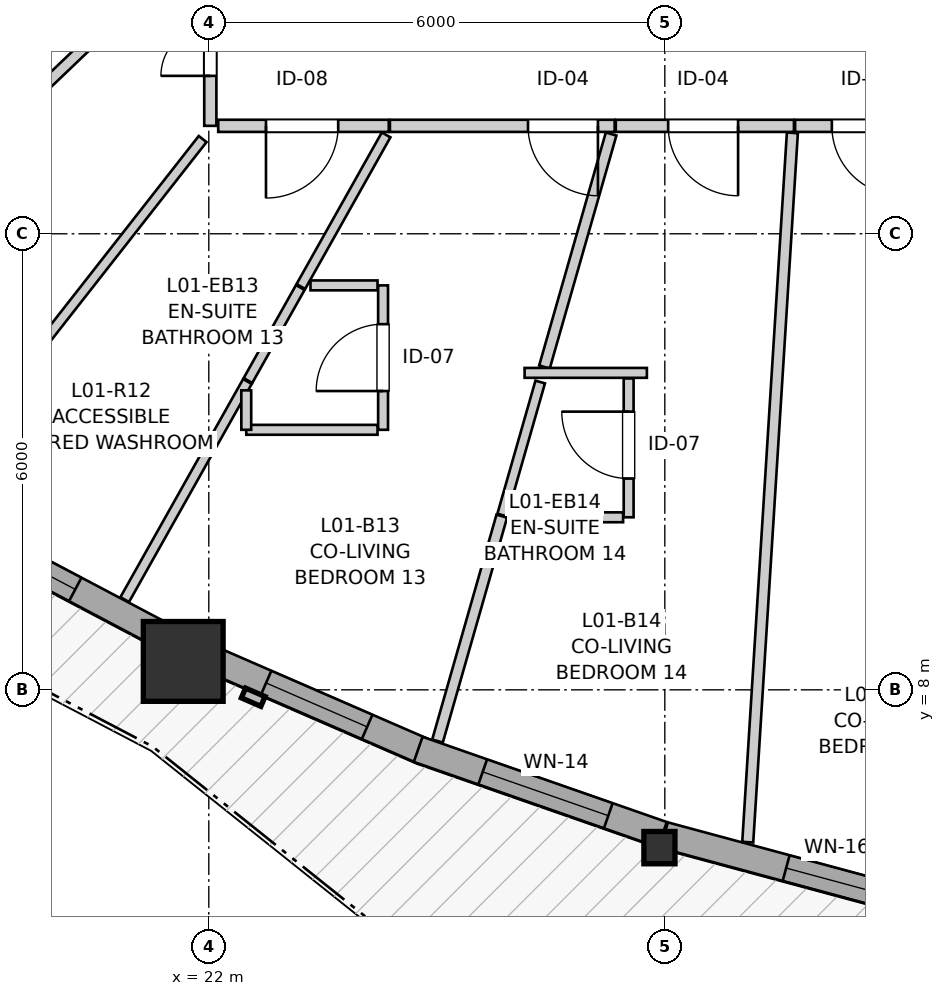
"""IFC4 building model, lengths in metres.
Left out: names, types, materials, properties, quantities, classifications, styles, units other than length and angle.
Written with IfcOpenShell. Run it as: python <this file> out.ifc"""

import sys

from ifc_helpers import new_model, si_unit, direction, frame, frame_2d, origin, origin_2d, place, context, subcontext, project, spatial, rectangle, i_section, extrude, source, transform, mapped, element, fill, save


model = new_model("IFC4")
c1 = context("Model", 3, precision=1e-05, world=origin(), true_north=direction((0.0, 1.0)))
c2 = subcontext(c1, "Body", "Model", "MODEL_VIEW")
j1 = project(units=[si_unit("LENGTHUNIT", "METRE"), si_unit("PLANEANGLEUNIT", "RADIAN")], contexts=[c1])
p1 = place(None, origin())
s1 = spatial("IfcSite", under=j1, at=p1, CompositionType="ELEMENT")
p2 = place(p1, origin())
s2 = spatial("IfcBuilding", under=s1, at=p2, CompositionType="ELEMENT")
p3 = place(p2, frame((0.0, 0.0, 7.8)))
s3 = spatial("IfcBuildingStorey", under=s2, at=p3, CompositionType="ELEMENT", Elevation=7.8)
m1 = source(origin(), c2, "Body", "SweptSolid", [
    extrude(rectangle(XDim=1.05, YDim=1.05, at=origin_2d()), origin(), (0.0, 0.0, 1.0), 2.94),
])
p4 = place(p3, frame((21.664, 8.374, 0.0), z_axis=(0.0, 0.0, 1.0), x_axis=(1.0, 0.0, 0.0)))
e1 = element("IfcColumn", 1, at=p4, inside=s3, PredefinedType="COLUMN", context=c2, shape_type="MappedRepresentation", body=[
    mapped(m1, transform((0.0, 0.0, 0.0), x_axis=(1.0, 0.0, 0.0), y_axis=(0.0, 1.0, 0.0), z_axis=(0.0, 0.0, 1.0), scale=1.0)),
])
m2 = source(origin(), c2, "Body", "SweptSolid", [
    extrude(i_section(OverallWidth=0.409, OverallDepth=0.425, WebThickness=0.03, FlangeThickness=0.048, FilletRadius=0.015, at=origin_2d()), origin(), (0.0, 0.0, 1.0), 2.94),
])
p5 = place(p3, frame((27.929, 5.924, 0.0), z_axis=(0.0, 0.0, 1.0), x_axis=(1.0, 0.0, 0.0)))
e2 = element("IfcColumn", 2, at=p5, inside=s3, PredefinedType="PILASTER", context=c2, shape_type="MappedRepresentation", body=[
    mapped(m2, transform((0.0, 0.0, 0.0), x_axis=(1.0, 0.0, 0.0), y_axis=(0.0, 1.0, 0.0), z_axis=(0.0, 0.0, 1.0), scale=1.0)),
])
p6 = place(p3, frame((18.769, 10.1, 0.0), z_axis=(0.0, 0.0, 1.0), x_axis=(0.884401188265, -0.466727477438, 0.0)))
e3 = element("IfcWall", 3, at=p6, inside=s3, PredefinedType="SOLIDWALL", context=c2, shape_type="SweptSolid", body=[
    extrude(rectangle(XDim=3.066, YDim=0.35, at=frame_2d((1.533, 0.0))), origin(), (0.0, 0.0, 1.0), 2.42),
])
p7 = place(p6, frame((0.717, 0.0, 0.82)))
e4 = element("IfcOpeningElement", 4, at=p7, cuts=e3, PredefinedType="OPENING", context=c2, shape_type="SweptSolid", body=[
    extrude(rectangle(XDim=0.95, YDim=1.35, at=frame_2d((0.475, 0.675))), frame((0.0, 0.185, 0.0), z_axis=(0.0, -1.0, 0.0), x_axis=(1.0, 0.0, 0.0)), (0.0, 0.0, 1.0), 0.37),
])
p8 = place(p3, frame((22.009, 8.415, 0.0), z_axis=(0.0, 0.0, 1.0), x_axis=(0.917077605242, -0.398708748292, 0.0)))
e5 = element("IfcWall", 5, at=p8, inside=s3, PredefinedType="SOLIDWALL", context=c2, shape_type="SweptSolid", body=[
    extrude(rectangle(XDim=3.085, YDim=0.35, at=frame_2d((1.542, 0.0))), origin(), (0.0, 0.0, 1.0), 2.42),
])
p9 = place(p8, frame((0.812, 0.0, 0.82)))
e6 = element("IfcOpeningElement", 6, at=p9, cuts=e5, PredefinedType="OPENING", context=c2, shape_type="SweptSolid", body=[
    extrude(rectangle(XDim=1.45, YDim=1.25, at=frame_2d((0.725, 0.625))), frame((0.0, 0.185, 0.0), z_axis=(0.0, -1.0, 0.0), x_axis=(1.0, 0.0, 0.0)), (0.0, 0.0, 1.0), 0.37),
])
p10 = place(p3, frame((24.755, 7.217, 0.0), z_axis=(0.0, 0.0, 1.0), x_axis=(0.944148800827, -0.329519410501, 0.0)))
e7 = element("IfcWall", 7, at=p10, inside=s3, PredefinedType="SOLIDWALL", context=c2, shape_type="SweptSolid", body=[
    extrude(rectangle(XDim=3.403, YDim=0.35, at=frame_2d((1.701, 0.0))), origin(), (0.0, 0.0, 1.0), 2.42),
])
p11 = place(p10, frame((0.899, 0.0, 0.82)))
e8 = element("IfcOpeningElement", 8, at=p11, cuts=e7, PredefinedType="OPENING", context=c2, shape_type="SweptSolid", body=[
    extrude(rectangle(XDim=1.75, YDim=1.3, at=frame_2d((0.875, 0.65))), frame((0.0, 0.185, 0.0), z_axis=(0.0, -1.0, 0.0), x_axis=(1.0, 0.0, 0.0)), (0.0, 0.0, 1.0), 0.37),
])
p12 = place(p3, frame((27.994, 6.088, 0.0), z_axis=(0.0, 0.0, 1.0), x_axis=(0.965452701472, -0.260578359079, 0.0)))
e9 = element("IfcWall", 9, at=p12, inside=s3, PredefinedType="SOLIDWALL", context=c2, shape_type="SweptSolid", body=[
    extrude(rectangle(XDim=3.459, YDim=0.35, at=frame_2d((1.729, 0.0))), origin(), (0.0, 0.0, 1.0), 2.42),
])
p13 = place(p12, frame((1.66, 0.0, 0.82)))
e10 = element("IfcOpeningElement", 10, at=p13, cuts=e9, PredefinedType="OPENING", context=c2, shape_type="SweptSolid", body=[
    extrude(rectangle(XDim=1.15, YDim=1.2, at=frame_2d((0.575, 0.6))), frame((0.0, 0.185, 0.0), z_axis=(0.0, -1.0, 0.0), x_axis=(1.0, 0.0, 0.0)), (0.0, 0.0, 1.0), 0.37),
])
p14 = place(p3, frame((27.34, 15.42, 0.0), z_axis=(0.0, 0.0, 1.0), x_axis=(-1.0, 0.0, 0.0)))
e11 = element("IfcWall", 11, at=p14, inside=s3, PredefinedType="PARTITIONING", context=c2, shape_type="SweptSolid", body=[
    extrude(rectangle(XDim=2.957, YDim=0.16, at=frame_2d((1.479, 0.0))), origin(), (0.0, 0.0, 1.0), 2.94),
])
p15 = place(p14, frame((0.22, 0.0, 0.0)))
e12 = element("IfcOpeningElement", 12, at=p15, cuts=e11, PredefinedType="OPENING", context=c2, shape_type="SweptSolid", body=[
    extrude(rectangle(XDim=0.92, YDim=2.1, at=frame_2d((0.46, 1.05))), frame((0.0, 0.09, 0.0), z_axis=(0.0, -1.0, 0.0), x_axis=(1.0, 0.0, 0.0)), (0.0, 0.0, 1.0), 0.18),
])
p16 = place(p3, frame((22.02, 15.42, 0.0), z_axis=(0.0, 0.0, 1.0), x_axis=(0.0, 1.0, 0.0)))
e13 = element("IfcWall", 13, at=p16, inside=s3, PredefinedType="PARTITIONING", context=c2, shape_type="SweptSolid", body=[
    extrude(rectangle(XDim=2.579, YDim=0.16, at=frame_2d((1.29, 0.0))), origin(), (0.0, 0.0, 1.0), 2.94),
])
p17 = place(p16, frame((0.657, 0.0, 0.0)))
e14 = element("IfcOpeningElement", 14, at=p17, cuts=e13, PredefinedType="OPENING", context=c2, shape_type="SweptSolid", body=[
    extrude(rectangle(XDim=1.3, YDim=2.1, at=frame_2d((0.65, 1.05))), frame((0.0, 0.09, 0.0), z_axis=(0.0, -1.0, 0.0), x_axis=(1.0, 0.0, 0.0)), (0.0, 0.0, 1.0), 0.18),
])
p18 = place(p3, frame((29.699, 15.42, 0.0), z_axis=(0.0, 0.0, 1.0), x_axis=(-1.0, 0.0, 0.0)))
e15 = element("IfcWall", 15, at=p18, inside=s3, PredefinedType="PARTITIONING", context=c2, shape_type="SweptSolid", body=[
    extrude(rectangle(XDim=2.344, YDim=0.16, at=frame_2d((1.172, 0.0))), origin(), (0.0, 0.0, 1.0), 2.94),
])
p19 = place(p18, frame((0.735, 0.0, 0.0)))
e16 = element("IfcOpeningElement", 16, at=p19, cuts=e15, PredefinedType="OPENING", context=c2, shape_type="SweptSolid", body=[
    extrude(rectangle(XDim=0.92, YDim=2.1, at=frame_2d((0.46, 1.05))), frame((0.0, 0.09, 0.0), z_axis=(0.0, -1.0, 0.0), x_axis=(1.0, 0.0, 0.0)), (0.0, 0.0, 1.0), 0.18),
])
p20 = place(p3, frame((24.368, 15.42, 0.0), z_axis=(0.0, 0.0, 1.0), x_axis=(-1.0, 0.0, 0.0)))
e17 = element("IfcWall", 17, at=p20, inside=s3, PredefinedType="PARTITIONING", context=c2, shape_type="SweptSolid", body=[
    extrude(rectangle(XDim=2.244, YDim=0.16, at=frame_2d((1.122, 0.0))), origin(), (0.0, 0.0, 1.0), 2.94),
])
p21 = place(p20, frame((0.666, 0.0, 0.0)))
e18 = element("IfcOpeningElement", 18, at=p21, cuts=e17, PredefinedType="OPENING", context=c2, shape_type="SweptSolid", body=[
    extrude(rectangle(XDim=0.95, YDim=2.1, at=frame_2d((0.475, 1.05))), frame((0.0, 0.09, 0.0), z_axis=(0.0, -1.0, 0.0), x_axis=(1.0, 0.0, 0.0)), (0.0, 0.0, 1.0), 0.18),
])
p22 = place(p3, frame((31.646, 15.42, 0.0), z_axis=(0.0, 0.0, 1.0), x_axis=(-1.0, 0.0, 0.0)))
e19 = element("IfcWall", 19, at=p22, inside=s3, PredefinedType="PARTITIONING", context=c2, shape_type="SweptSolid", body=[
    extrude(rectangle(XDim=1.932, YDim=0.16, at=frame_2d((0.966, 0.0))), origin(), (0.0, 0.0, 1.0), 2.94),
])
p23 = place(p22, frame((0.529, 0.0, 0.0)))
e20 = element("IfcOpeningElement", 20, at=p23, cuts=e19, PredefinedType="OPENING", context=c2, shape_type="SweptSolid", body=[
    extrude(rectangle(XDim=0.92, YDim=2.1, at=frame_2d((0.46, 1.05))), frame((0.0, 0.09, 0.0), z_axis=(0.0, -1.0, 0.0), x_axis=(1.0, 0.0, 0.0)), (0.0, 0.0, 1.0), 0.18),
])
p24 = place(p3, frame((24.293, 11.421, 0.0), z_axis=(0.0, 0.0, 1.0), x_axis=(0.0, 1.0, 0.0)))
e21 = element("IfcWall", 21, at=p24, inside=s3, PredefinedType="PARTITIONING", context=c2, shape_type="SweptSolid", body=[
    extrude(rectangle(XDim=1.9, YDim=0.13, at=frame_2d((0.95, 0.0))), origin(), (0.0, 0.0, 1.0), 2.94),
])
p25 = place(p24, frame((0.51, 0.0, 0.0)))
e22 = element("IfcOpeningElement", 22, at=p25, cuts=e21, PredefinedType="OPENING", context=c2, shape_type="SweptSolid", body=[
    extrude(rectangle(XDim=0.88, YDim=2.05, at=frame_2d((0.44, 1.025))), frame((0.0, 0.075, 0.0), z_axis=(0.0, -1.0, 0.0), x_axis=(1.0, 0.0, 0.0)), (0.0, 0.0, 1.0), 0.15),
])
p26 = place(p3, frame((27.524, 10.27, 0.0), z_axis=(0.0, 0.0, 1.0), x_axis=(0.0, 1.0, 0.0)))
e23 = element("IfcWall", 23, at=p26, inside=s3, PredefinedType="PARTITIONING", context=c2, shape_type="SweptSolid", body=[
    extrude(rectangle(XDim=1.827, YDim=0.13, at=frame_2d((0.914, 0.0))), origin(), (0.0, 0.0, 1.0), 2.94),
])
p27 = place(p26, frame((0.51, 0.0, 0.0)))
e24 = element("IfcOpeningElement", 24, at=p27, cuts=e23, PredefinedType="OPENING", context=c2, shape_type="SweptSolid", body=[
    extrude(rectangle(XDim=0.88, YDim=2.05, at=frame_2d((0.44, 1.025))), frame((0.0, 0.075, 0.0), z_axis=(0.0, -1.0, 0.0), x_axis=(1.0, 0.0, 0.0)), (0.0, 0.0, 1.0), 0.15),
])
p28 = place(p3, frame((29.091, 5.996, 0.0), z_axis=(0.0, 0.0, 1.0), x_axis=(0.062797687125, 0.998026277456, 0.0)))
e25 = element("IfcWall", 25, at=p28, inside=s3, PredefinedType="PARTITIONING", context=c2, shape_type="SweptSolid", body=[
    extrude(rectangle(XDim=9.35, YDim=0.145, at=frame_2d((4.675, 0.0))), origin(), (0.0, 0.0, 1.0), 2.94),
])
p29 = place(p3, frame((15.888, 12.171, 0.0), z_axis=(0.0, 0.0, 1.0), x_axis=(0.722733244608, 0.691127091886, 0.0)))
e26 = element("IfcWall", 26, at=p29, inside=s3, PredefinedType="PARTITIONING", context=c2, shape_type="SweptSolid", body=[
    extrude(rectangle(XDim=8.296, YDim=0.145, at=frame_2d((4.148, 0.0))), origin(), (0.0, 0.0, 1.0), 2.94),
])
p30 = place(p3, frame((18.296, 10.625, 0.0), z_axis=(0.0, 0.0, 1.0), x_axis=(0.616906721473, 0.787036274261, 0.0)))
e27 = element("IfcWall", 27, at=p30, inside=s3, PredefinedType="PARTITIONING", context=c2, shape_type="SweptSolid", body=[
    extrude(rectangle(XDim=5.872, YDim=0.13, at=frame_2d((2.936, 0.0))), origin(), (0.0, 0.0, 1.0), 2.94),
])
p31 = place(p3, frame((26.417, 12.248, 0.0), z_axis=(0.0, 0.0, 1.0), x_axis=(0.275014447674, 0.961440093594, 0.0)))
e28 = element("IfcWall", 28, at=p31, inside=s3, PredefinedType="PARTITIONING", context=c2, shape_type="SweptSolid", body=[
    extrude(rectangle(XDim=3.188, YDim=0.145, at=frame_2d((1.594, 0.0))), origin(), (0.0, 0.0, 1.0), 2.94),
])
p32 = place(p3, frame((20.894, 9.187, 0.0), z_axis=(0.0, 0.0, 1.0), x_axis=(0.490433761368, 0.871478471169, 0.0)))
e29 = element("IfcWall", 29, at=p32, inside=s3, PredefinedType="PARTITIONING", context=c2, shape_type="SweptSolid", body=[
    extrude(rectangle(XDim=3.292, YDim=0.13, at=frame_2d((1.646, 0.0))), origin(), (0.0, 0.0, 1.0), 2.94),
])
p33 = place(p3, frame((25.009, 7.327, 0.0), z_axis=(0.0, 0.0, 1.0), x_axis=(0.274867847045, 0.961482015776, 0.0)))
e30 = element("IfcWall", 30, at=p33, inside=s3, PredefinedType="PARTITIONING", context=c2, shape_type="SweptSolid", body=[
    extrude(rectangle(XDim=3.077, YDim=0.145, at=frame_2d((1.538, 0.0))), origin(), (0.0, 0.0, 1.0), 2.94),
])
p34 = place(p3, frame((23.211, 13.306, 0.0), z_axis=(0.0, 0.0, 1.0), x_axis=(0.490235923681, 0.871589776864, 0.0)))
e31 = element("IfcWall", 31, at=p34, inside=s3, PredefinedType="PARTITIONING", context=c2, shape_type="SweptSolid", body=[
    extrude(rectangle(XDim=2.289, YDim=0.13, at=frame_2d((1.145, 0.0))), origin(), (0.0, 0.0, 1.0), 2.94),
])
p35 = place(p3, frame((25.86, 10.299, 0.0), z_axis=(0.0, 0.0, 1.0), x_axis=(0.275022188369, 0.961437879379, 0.0)))
e32 = element("IfcWall", 32, at=p35, inside=s3, PredefinedType="PARTITIONING", context=c2, shape_type="SweptSolid", body=[
    extrude(rectangle(XDim=1.821, YDim=0.13, at=frame_2d((0.91, 0.0))), origin(), (0.0, 0.0, 1.0), 2.94),
])
p36 = place(p3, frame((22.493, 11.421, 0.0), z_axis=(0.0, 0.0, 1.0), x_axis=(1.0, 0.0, 0.0)))
e33 = element("IfcWall", 33, at=p36, inside=s3, PredefinedType="PARTITIONING", context=c2, shape_type="SweptSolid", body=[
    extrude(rectangle(XDim=1.727, YDim=0.13, at=frame_2d((0.864, 0.0))), origin(), (0.0, 0.0, 1.0), 2.508),
])
p37 = place(p3, frame((25.953, 10.27, 0.0), z_axis=(0.0, 0.0, 1.0), x_axis=(1.0, 0.0, 0.0)))
e34 = element("IfcWall", 34, at=p37, inside=s3, PredefinedType="PARTITIONING", context=c2, shape_type="SweptSolid", body=[
    extrude(rectangle(XDim=1.498, YDim=0.13, at=frame_2d((0.749, 0.0))), origin(), (0.0, 0.0, 1.0), 2.508),
])
p38 = place(p3, frame((22.515, 12.069, 0.0), z_axis=(0.0, 0.0, 1.0), x_axis=(0.490286002917, 0.871561607314, 0.0)))
e35 = element("IfcWall", 35, at=p38, inside=s3, PredefinedType="PARTITIONING", context=c2, shape_type="SweptSolid", body=[
    extrude(rectangle(XDim=1.404, YDim=0.13, at=frame_2d((0.702, 0.0))), origin(), (0.0, 0.0, 1.0), 2.94),
])
p39 = place(p3, frame((26.155, 12.17, 0.0), z_axis=(0.0, 0.0, 1.0), x_axis=(1.0, 0.0, 0.0)))
e36 = element("IfcWall", 36, at=p39, inside=s3, PredefinedType="PARTITIONING", context=c2, shape_type="SweptSolid", body=[
    extrude(rectangle(XDim=1.609, YDim=0.13, at=frame_2d((0.804, 0.0))), origin(), (0.0, 0.0, 1.0), 2.94),
])
p40 = place(p3, frame((23.338, 13.321, 0.0), z_axis=(0.0, 0.0, 1.0), x_axis=(1.0, 0.0, 0.0)))
e37 = element("IfcWall", 37, at=p40, inside=s3, PredefinedType="PARTITIONING", context=c2, shape_type="SweptSolid", body=[
    extrude(rectangle(XDim=0.882, YDim=0.13, at=frame_2d((0.441, 0.0))), origin(), (0.0, 0.0, 1.0), 2.94),
])
p41 = place(p3, frame((22.493, 11.421, 0.0), z_axis=(0.0, 0.0, 1.0), x_axis=(0.0, 1.0, 0.0)))
e38 = element("IfcWall", 38, at=p41, inside=s3, PredefinedType="PARTITIONING", context=c2, shape_type="SweptSolid", body=[
    extrude(rectangle(XDim=0.519, YDim=0.13, at=frame_2d((0.26, 0.0))), origin(), (0.0, 0.0, 1.0), 2.94),
])
m3 = source(origin(), c2, "Body", "SweptSolid", [
    extrude(rectangle(XDim=0.95, YDim=1.35, at=frame_2d((0.475, 0.675))), frame((0.0, 0.03, 0.0), z_axis=(0.0, -1.0, 0.0), x_axis=(1.0, 0.0, 0.0)), (0.0, 0.0, 1.0), 0.06),
])
p42 = place(p7, origin())
e39 = element("IfcWindow", 39, at=p42, inside=s3, PartitioningType="SINGLE_PANEL", PredefinedType="WINDOW", context=c2, shape_type="MappedRepresentation", body=[
    mapped(m3, transform((0.0, 0.0, 0.0), x_axis=(1.0, 0.0, 0.0), y_axis=(0.0, 1.0, 0.0), z_axis=(0.0, 0.0, 1.0), scale=1.0)),
])
fill(e4, e39)
m4 = source(origin(), c2, "Body", "SweptSolid", [
    extrude(rectangle(XDim=1.45, YDim=1.25, at=frame_2d((0.725, 0.625))), frame((0.0, 0.03, 0.0), z_axis=(0.0, -1.0, 0.0), x_axis=(1.0, 0.0, 0.0)), (0.0, 0.0, 1.0), 0.06),
])
p43 = place(p9, origin())
e40 = element("IfcWindow", 40, at=p43, inside=s3, PartitioningType="SINGLE_PANEL", PredefinedType="WINDOW", context=c2, shape_type="MappedRepresentation", body=[
    mapped(m4, transform((0.0, 0.0, 0.0), x_axis=(1.0, 0.0, 0.0), y_axis=(0.0, 1.0, 0.0), z_axis=(0.0, 0.0, 1.0), scale=1.0)),
])
fill(e6, e40)
m5 = source(origin(), c2, "Body", "SweptSolid", [
    extrude(rectangle(XDim=1.75, YDim=1.3, at=frame_2d((0.875, 0.65))), frame((0.0, 0.03, 0.0), z_axis=(0.0, -1.0, 0.0), x_axis=(1.0, 0.0, 0.0)), (0.0, 0.0, 1.0), 0.06),
])
p44 = place(p11, origin())
e41 = element("IfcWindow", 41, at=p44, inside=s3, PartitioningType="SINGLE_PANEL", PredefinedType="WINDOW", context=c2, shape_type="MappedRepresentation", body=[
    mapped(m5, transform((0.0, 0.0, 0.0), x_axis=(1.0, 0.0, 0.0), y_axis=(0.0, 1.0, 0.0), z_axis=(0.0, 0.0, 1.0), scale=1.0)),
])
fill(e8, e41)
m6 = source(origin(), c2, "Body", "SweptSolid", [
    extrude(rectangle(XDim=1.15, YDim=1.2, at=frame_2d((0.575, 0.6))), frame((0.0, 0.03, 0.0), z_axis=(0.0, -1.0, 0.0), x_axis=(1.0, 0.0, 0.0)), (0.0, 0.0, 1.0), 0.06),
])
p45 = place(p13, origin())
e42 = element("IfcWindow", 42, at=p45, inside=s3, PartitioningType="SINGLE_PANEL", PredefinedType="WINDOW", context=c2, shape_type="MappedRepresentation", body=[
    mapped(m6, transform((0.0, 0.0, 0.0), x_axis=(1.0, 0.0, 0.0), y_axis=(0.0, 1.0, 0.0), z_axis=(0.0, 0.0, 1.0), scale=1.0)),
])
fill(e10, e42)
m7 = source(origin(), c2, "Body", "SweptSolid", [
    extrude(rectangle(XDim=0.92, YDim=2.1, at=frame_2d((0.46, 1.05))), frame((0.0, 0.025, 0.0), z_axis=(0.0, -1.0, 0.0), x_axis=(1.0, 0.0, 0.0)), (0.0, 0.0, 1.0), 0.05),
])
p46 = place(p15, origin())
e43 = element("IfcDoor", 43, at=p46, inside=s3, OperationType="SINGLE_SWING_LEFT", PredefinedType="DOOR", context=c2, shape_type="MappedRepresentation", body=[
    mapped(m7, transform((0.0, 0.0, 0.0), x_axis=(1.0, 0.0, 0.0), y_axis=(0.0, 1.0, 0.0), z_axis=(0.0, 0.0, 1.0), scale=1.0)),
])
fill(e12, e43)
m8 = source(origin(), c2, "Body", "SweptSolid", [
    extrude(rectangle(XDim=1.3, YDim=2.1, at=frame_2d((0.65, 1.05))), frame((0.0, 0.025, 0.0), z_axis=(0.0, -1.0, 0.0), x_axis=(1.0, 0.0, 0.0)), (0.0, 0.0, 1.0), 0.05),
])
p47 = place(p17, origin())
e44 = element("IfcDoor", 44, at=p47, inside=s3, OperationType="DOUBLE_DOOR_SINGLE_SWING", PredefinedType="DOOR", context=c2, shape_type="MappedRepresentation", body=[
    mapped(m8, transform((0.0, 0.0, 0.0), x_axis=(1.0, 0.0, 0.0), y_axis=(0.0, 1.0, 0.0), z_axis=(0.0, 0.0, 1.0), scale=1.0)),
])
fill(e14, e44)
p48 = place(p19, origin())
e45 = element("IfcDoor", 45, at=p48, inside=s3, OperationType="SINGLE_SWING_LEFT", PredefinedType="DOOR", context=c2, shape_type="MappedRepresentation", body=[
    mapped(m7, transform((0.0, 0.0, 0.0), x_axis=(1.0, 0.0, 0.0), y_axis=(0.0, 1.0, 0.0), z_axis=(0.0, 0.0, 1.0), scale=1.0)),
])
fill(e16, e45)
m9 = source(origin(), c2, "Body", "SweptSolid", [
    extrude(rectangle(XDim=0.95, YDim=2.1, at=frame_2d((0.475, 1.05))), frame((0.0, 0.025, 0.0), z_axis=(0.0, -1.0, 0.0), x_axis=(1.0, 0.0, 0.0)), (0.0, 0.0, 1.0), 0.05),
])
p49 = place(p21, origin())
e46 = element("IfcDoor", 46, at=p49, inside=s3, OperationType="SINGLE_SWING_RIGHT", PredefinedType="DOOR", context=c2, shape_type="MappedRepresentation", body=[
    mapped(m9, transform((0.0, 0.0, 0.0), x_axis=(1.0, 0.0, 0.0), y_axis=(0.0, 1.0, 0.0), z_axis=(0.0, 0.0, 1.0), scale=1.0)),
])
fill(e18, e46)
p50 = place(p23, origin())
e47 = element("IfcDoor", 47, at=p50, inside=s3, OperationType="SINGLE_SWING_LEFT", PredefinedType="DOOR", context=c2, shape_type="MappedRepresentation", body=[
    mapped(m7, transform((0.0, 0.0, 0.0), x_axis=(1.0, 0.0, 0.0), y_axis=(0.0, 1.0, 0.0), z_axis=(0.0, 0.0, 1.0), scale=1.0)),
])
fill(e20, e47)
m10 = source(origin(), c2, "Body", "SweptSolid", [
    extrude(rectangle(XDim=0.88, YDim=2.05, at=frame_2d((0.44, 1.025))), frame((0.0, 0.025, 0.0), z_axis=(0.0, -1.0, 0.0), x_axis=(1.0, 0.0, 0.0)), (0.0, 0.0, 1.0), 0.05),
])
p51 = place(p25, origin())
e48 = element("IfcDoor", 48, at=p51, inside=s3, OperationType="SINGLE_SWING_LEFT", PredefinedType="DOOR", context=c2, shape_type="MappedRepresentation", body=[
    mapped(m10, transform((0.0, 0.0, 0.0), x_axis=(1.0, 0.0, 0.0), y_axis=(0.0, 1.0, 0.0), z_axis=(0.0, 0.0, 1.0), scale=1.0)),
])
fill(e22, e48)
p52 = place(p27, origin())
e49 = element("IfcDoor", 49, at=p52, inside=s3, OperationType="SINGLE_SWING_RIGHT", PredefinedType="DOOR", context=c2, shape_type="MappedRepresentation", body=[
    mapped(m10, transform((0.0, 0.0, 0.0), x_axis=(1.0, 0.0, 0.0), y_axis=(0.0, 1.0, 0.0), z_axis=(0.0, 0.0, 1.0), scale=1.0)),
])
fill(e24, e49)
save(model, sys.argv[1])
